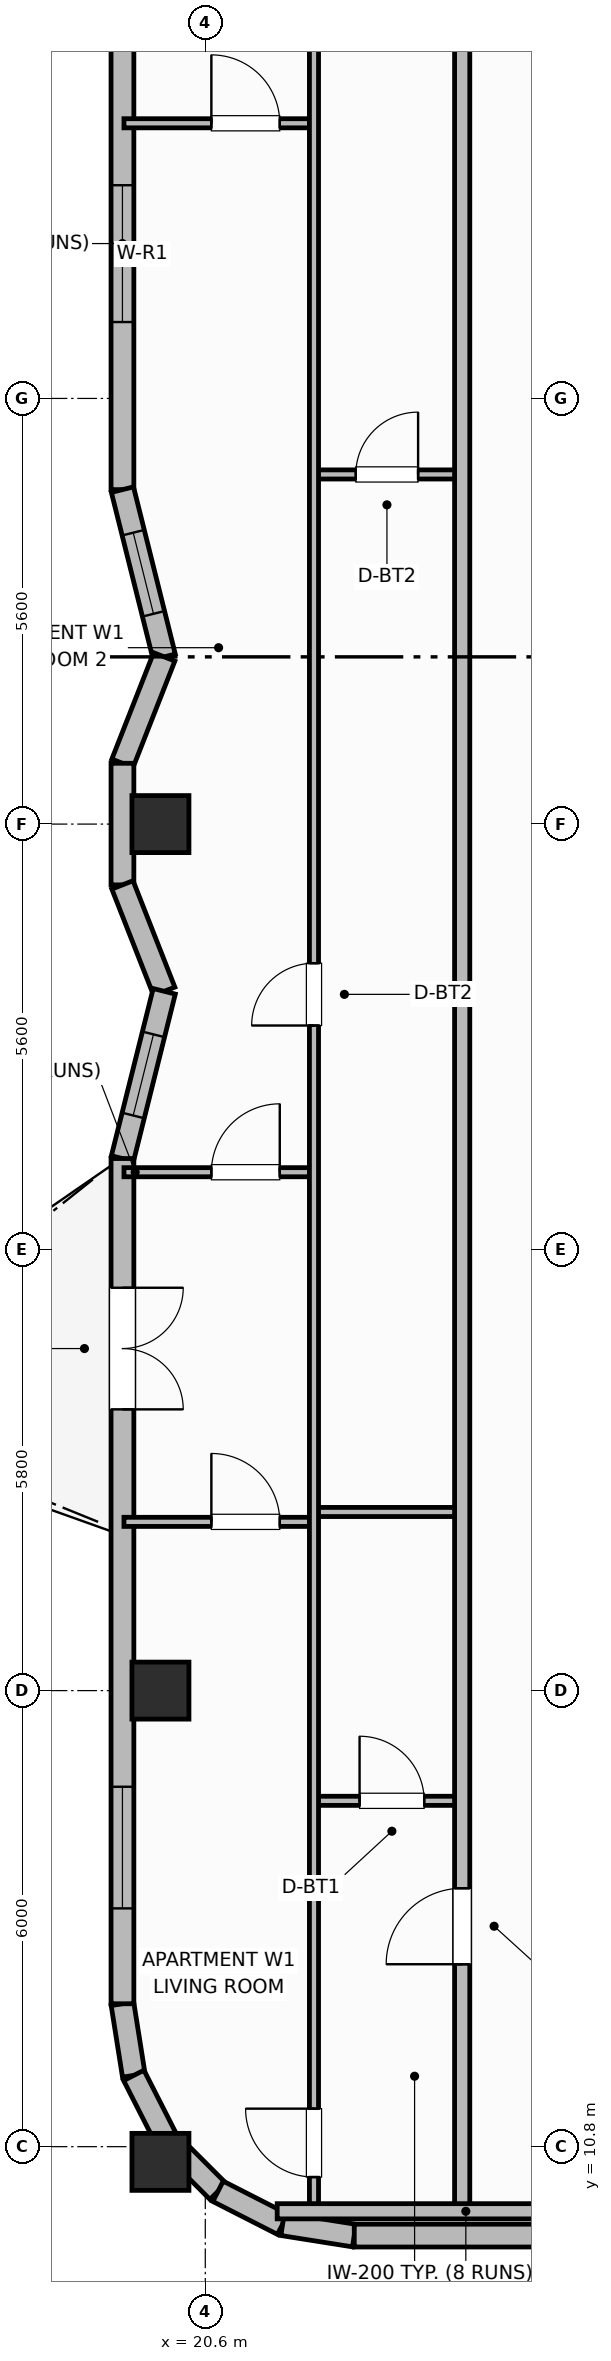
"""IFC4 building model, lengths in metres.
Left out: names, types, materials, properties, quantities, classifications, styles, units other than length and angle.
Written with IfcOpenShell. Run it as: python <this file> out.ifc"""

import sys

from ifc_helpers import new_model, si_unit, direction, frame, frame_2d, origin, origin_2d, place, context, subcontext, project, spatial, rectangle, extrude, element, fill, save


model = new_model("IFC4")
c1 = context("Model", 3, precision=1e-05, world=origin(), true_north=direction((0.0, 1.0)))
c2 = subcontext(c1, "Body", "Model", "MODEL_VIEW")
j1 = project(units=[si_unit("LENGTHUNIT", "METRE"), si_unit("PLANEANGLEUNIT", "RADIAN")], contexts=[c1])
p1 = place(None, origin())
s1 = spatial("IfcSite", under=j1, at=p1, CompositionType="ELEMENT")
p2 = place(p1, origin())
s2 = spatial("IfcBuilding", under=s1, at=p2, CompositionType="ELEMENT")
p3 = place(p2, frame((0.0, 0.0, 263.9)))
s3 = spatial("IfcBuildingStorey", under=s2, at=p3, CompositionType="ELEMENT", Elevation=263.9)
for number, where, z_axis, x_axis in (
    (1, (20.01, 10.6, 0.0), (0.0, 0.0, 1.0), (1.0, 0.0, 0.0)),
    (2, (20.01, 16.8, 0.0), (0.0, 0.0, 1.0), (1.0, 0.0, 0.0)),
    (3, (20.01, 28.2, 0.0), (0.0, 0.0, 1.0), (1.0, 0.0, 0.0)),
):
    element("IfcColumn", number, at=place(p3, frame(where, z_axis=z_axis, x_axis=x_axis)), inside=s3, PredefinedType="COLUMN", context=c2, shape_type="SweptSolid", body=[
        extrude(rectangle(XDim=0.75, YDim=0.75, at=origin_2d()), origin(), (0.0, 0.0, 1.0), 3.7),
    ])
p4 = place(p3, frame((19.51, 12.68, 0.0), z_axis=(0.0, 0.0, 1.0), x_axis=(0.156343617883, -0.987702725088, 0.0)))
e4 = element("IfcWall", 4, at=p4, inside=s3, PredefinedType="SOLIDWALL", context=c2, shape_type="SweptSolid", body=[
    extrude(rectangle(XDim=0.954, YDim=0.3, at=frame_2d((0.477, 0.0))), origin(), (0.0, 0.0, 1.0), 2.73),
])
for number, where, z_axis, x_axis in (
    (5, (19.659, 11.738, 0.0), (0.0, 0.0, 1.0), (0.454, -0.891, 0.0)),
    (6, (20.093, 10.887, 0.0), (0.0, 0.0, 1.0), (0.707, -0.707, 0.0)),
):
    element("IfcWall", number, at=place(p3, frame(where, z_axis=z_axis, x_axis=x_axis)), inside=s3, PredefinedType="SOLIDWALL", context=c2, shape_type="SweptSolid", body=[
        extrude(rectangle(XDim=0.954, YDim=0.3, at=frame_2d((0.477, 0.0))), origin(), (0.0, 0.0, 1.0), 2.73),
    ])
p5 = place(p3, frame((20.767, 10.212, 0.0), z_axis=(0.0, 0.0, 1.0), x_axis=(0.891023873617, -0.45395644796, 0.0)))
e7 = element("IfcWall", 7, at=p5, inside=s3, PredefinedType="SOLIDWALL", context=c2, shape_type="SweptSolid", body=[
    extrude(rectangle(XDim=0.954, YDim=0.3, at=frame_2d((0.477, 0.0))), origin(), (0.0, 0.0, 1.0), 2.73),
])
p6 = place(p3, frame((21.617, 9.779, 0.0), z_axis=(0.0, 0.0, 1.0), x_axis=(0.987669453596, -0.156553666304, 0.0)))
e8 = element("IfcWall", 8, at=p6, inside=s3, PredefinedType="SOLIDWALL", context=c2, shape_type="SweptSolid", body=[
    extrude(rectangle(XDim=0.954, YDim=0.3, at=frame_2d((0.477, 0.0))), origin(), (0.0, 0.0, 1.0), 2.73),
])
p7 = place(p3, frame((22.56, 9.63, 0.0), z_axis=(0.0, 0.0, 1.0), x_axis=(1.0, 0.0, 0.0)))
e9 = element("IfcWall", 9, at=p7, inside=s3, PredefinedType="SOLIDWALL", context=c2, shape_type="SweptSolid", body=[
    extrude(rectangle(XDim=33.28, YDim=0.3, at=frame_2d((16.64, 0.0))), origin(), (0.0, 0.0, 1.0), 2.73),
])
p8 = place(p7, frame((5.18, 0.0, 0.71)))
e10 = element("IfcOpeningElement", 10, at=p8, cuts=e9, PredefinedType="OPENING", context=c2, shape_type="SweptSolid", body=[
    extrude(rectangle(XDim=1.6, YDim=1.9, at=frame_2d((0.8, 0.95))), frame((0.0, 0.16, 0.0), z_axis=(0.0, -1.0, 0.0), x_axis=(1.0, 0.0, 0.0)), (0.0, 0.0, 1.0), 0.32),
])
p9 = place(p7, frame((8.733, 0.0, 0.71)))
e11 = element("IfcOpeningElement", 11, at=p9, cuts=e9, PredefinedType="OPENING", context=c2, shape_type="SweptSolid", body=[
    extrude(rectangle(XDim=1.6, YDim=1.9, at=frame_2d((0.8, 0.95))), frame((0.0, 0.16, 0.0), z_axis=(0.0, -1.0, 0.0), x_axis=(1.0, 0.0, 0.0)), (0.0, 0.0, 1.0), 0.32),
])
p10 = place(p7, frame((15.84, 0.0, 0.71)))
e12 = element("IfcOpeningElement", 12, at=p10, cuts=e9, PredefinedType="OPENING", context=c2, shape_type="SweptSolid", body=[
    extrude(rectangle(XDim=1.6, YDim=1.9, at=frame_2d((0.8, 0.95))), frame((0.0, 0.16, 0.0), z_axis=(0.0, -1.0, 0.0), x_axis=(1.0, 0.0, 0.0)), (0.0, 0.0, 1.0), 0.32),
])
p11 = place(p7, frame((22.947, 0.0, 0.71)))
e13 = element("IfcOpeningElement", 13, at=p11, cuts=e9, PredefinedType="OPENING", context=c2, shape_type="SweptSolid", body=[
    extrude(rectangle(XDim=1.6, YDim=1.9, at=frame_2d((0.8, 0.95))), frame((0.0, 0.16, 0.0), z_axis=(0.0, -1.0, 0.0), x_axis=(1.0, 0.0, 0.0)), (0.0, 0.0, 1.0), 0.32),
])
p12 = place(p7, frame((26.5, 0.0, 0.71)))
e14 = element("IfcOpeningElement", 14, at=p12, cuts=e9, PredefinedType="OPENING", context=c2, shape_type="SweptSolid", body=[
    extrude(rectangle(XDim=1.6, YDim=1.9, at=frame_2d((0.8, 0.95))), frame((0.0, 0.16, 0.0), z_axis=(0.0, -1.0, 0.0), x_axis=(1.0, 0.0, 0.0)), (0.0, 0.0, 1.0), 0.32),
])
p13 = place(p3, frame((19.51, 43.72, 0.0), z_axis=(0.0, 0.0, 1.0), x_axis=(0.0, -1.0, 0.0)))
e15 = element("IfcWall", 15, at=p13, inside=s3, PredefinedType="SOLIDWALL", context=c2, shape_type="SweptSolid", body=[
    extrude(rectangle(XDim=11.12, YDim=0.3, at=frame_2d((5.56, 0.0))), origin(), (0.0, 0.0, 1.0), 2.73),
])
p14 = place(p13, frame((1.08, 0.0, 0.72)))
e16 = element("IfcOpeningElement", 16, at=p14, cuts=e15, PredefinedType="OPENING", context=c2, shape_type="SweptSolid", body=[
    extrude(rectangle(XDim=1.4, YDim=1.85, at=frame_2d((0.7, 0.925))), frame((0.0, 0.16, 0.0), z_axis=(0.0, -1.0, 0.0), x_axis=(1.0, 0.0, 0.0)), (0.0, 0.0, 1.0), 0.32),
])
p15 = place(p13, frame((7.115, 0.0, 0.76)))
e17 = element("IfcOpeningElement", 17, at=p15, cuts=e15, PredefinedType="OPENING", context=c2, shape_type="SweptSolid", body=[
    extrude(rectangle(XDim=1.8, YDim=1.85, at=frame_2d((0.9, 0.925))), frame((0.0, 0.16, 0.0), z_axis=(0.0, -1.0, 0.0), x_axis=(1.0, 0.0, 0.0)), (0.0, 0.0, 1.0), 0.32),
])
p16 = place(p3, frame((19.51, 32.6, 0.0), z_axis=(0.0, 0.0, 1.0), x_axis=(0.242535625036, -0.970142500145, 0.0)))
e18 = element("IfcWall", 18, at=p16, inside=s3, PredefinedType="SOLIDWALL", context=c2, shape_type="SweptSolid", body=[
    extrude(rectangle(XDim=2.268, YDim=0.3, at=frame_2d((1.134, 0.0))), origin(), (0.0, 0.0, 1.0), 2.73),
])
p17 = place(p16, frame((0.584, 0.0, 0.92)))
e19 = element("IfcOpeningElement", 19, at=p17, cuts=e18, PredefinedType="OPENING", context=c2, shape_type="SweptSolid", body=[
    extrude(rectangle(XDim=1.1, YDim=1.65, at=frame_2d((0.55, 0.825))), frame((0.0, 0.16, 0.0), z_axis=(0.0, -1.0, 0.0), x_axis=(1.0, 0.0, 0.0)), (0.0, 0.0, 1.0), 0.32),
])
p18 = place(p3, frame((20.06, 30.4, 0.0), z_axis=(0.0, 0.0, 1.0), x_axis=(-0.365702591843, -0.930731762818, 0.0)))
e20 = element("IfcWall", 20, at=p18, inside=s3, PredefinedType="SOLIDWALL", context=c2, shape_type="SweptSolid", body=[
    extrude(rectangle(XDim=1.504, YDim=0.3, at=frame_2d((0.752, 0.0))), origin(), (0.0, 0.0, 1.0), 2.73),
])
p19 = place(p3, frame((19.51, 29.0, 0.0), z_axis=(0.0, 0.0, 1.0), x_axis=(0.0, -1.0, 0.0)))
e21 = element("IfcWall", 21, at=p19, inside=s3, PredefinedType="SOLIDWALL", context=c2, shape_type="SweptSolid", body=[
    extrude(rectangle(XDim=1.6, YDim=0.3, at=frame_2d((0.8, 0.0))), origin(), (0.0, 0.0, 1.0), 2.73),
])
p20 = place(p3, frame((19.51, 27.4, 0.0), z_axis=(0.0, 0.0, 1.0), x_axis=(0.365702591843, -0.930731762818, 0.0)))
e22 = element("IfcWall", 22, at=p20, inside=s3, PredefinedType="SOLIDWALL", context=c2, shape_type="SweptSolid", body=[
    extrude(rectangle(XDim=1.504, YDim=0.3, at=frame_2d((0.752, 0.0))), origin(), (0.0, 0.0, 1.0), 2.73),
])
p21 = place(p3, frame((20.06, 26.0, 0.0), z_axis=(0.0, 0.0, 1.0), x_axis=(-0.242560957029, -0.970136166796, 0.0)))
e23 = element("IfcWall", 23, at=p21, inside=s3, PredefinedType="SOLIDWALL", context=c2, shape_type="SweptSolid", body=[
    extrude(rectangle(XDim=2.268, YDim=0.3, at=frame_2d((1.134, 0.0))), origin(), (0.0, 0.0, 1.0), 2.73),
])
p22 = place(p21, frame((0.584, 0.0, 0.92)))
e24 = element("IfcOpeningElement", 24, at=p22, cuts=e23, PredefinedType="OPENING", context=c2, shape_type="SweptSolid", body=[
    extrude(rectangle(XDim=1.1, YDim=1.65, at=frame_2d((0.55, 0.825))), frame((0.0, 0.16, 0.0), z_axis=(0.0, -1.0, 0.0), x_axis=(1.0, 0.0, 0.0)), (0.0, 0.0, 1.0), 0.32),
])
p23 = place(p3, frame((19.51, 23.8, 0.0), z_axis=(0.0, 0.0, 1.0), x_axis=(0.0, -1.0, 0.0)))
e25 = element("IfcWall", 25, at=p23, inside=s3, PredefinedType="SOLIDWALL", context=c2, shape_type="SweptSolid", body=[
    extrude(rectangle(XDim=11.12, YDim=0.3, at=frame_2d((5.56, 0.0))), origin(), (0.0, 0.0, 1.0), 2.73),
])
p24 = place(p23, frame((1.7, 0.0, 0.0)))
e26 = element("IfcOpeningElement", 26, at=p24, cuts=e25, PredefinedType="OPENING", context=c2, shape_type="SweptSolid", body=[
    extrude(rectangle(XDim=1.6, YDim=2.1, at=frame_2d((0.8, 1.05))), frame((0.0, 0.16, 0.0), z_axis=(0.0, -1.0, 0.0), x_axis=(1.0, 0.0, 0.0)), (0.0, 0.0, 1.0), 0.32),
])
p25 = place(p23, frame((8.265, 0.0, 0.71)))
e27 = element("IfcOpeningElement", 27, at=p25, cuts=e25, PredefinedType="OPENING", context=c2, shape_type="SweptSolid", body=[
    extrude(rectangle(XDim=1.6, YDim=1.9, at=frame_2d((0.8, 0.95))), frame((0.0, 0.16, 0.0), z_axis=(0.0, -1.0, 0.0), x_axis=(1.0, 0.0, 0.0)), (0.0, 0.0, 1.0), 0.32),
])
p26 = place(p3, frame((22.03, 15.35, 0.0), z_axis=(0.0, 0.0, 1.0), x_axis=(1.0, 0.0, 0.0)))
e28 = element("IfcWall", 28, at=p26, inside=s3, PredefinedType="PARTITIONING", context=c2, shape_type="SweptSolid", body=[
    extrude(rectangle(XDim=1.95, YDim=0.12, at=frame_2d((0.975, 0.0))), origin(), (0.0, 0.0, 1.0), 2.56),
])
p27 = place(p26, frame((0.6, 0.0, 0.0)))
e29 = element("IfcOpeningElement", 29, at=p27, cuts=e28, PredefinedType="OPENING", context=c2, shape_type="SweptSolid", body=[
    extrude(rectangle(XDim=0.85, YDim=2.1, at=frame_2d((0.425, 1.05))), frame((0.0, 0.07, 0.0), z_axis=(0.0, -1.0, 0.0), x_axis=(1.0, 0.0, 0.0)), (0.0, 0.0, 1.0), 0.14),
])
p28 = place(p3, frame((22.03, 19.15, 0.0), z_axis=(0.0, 0.0, 1.0), x_axis=(1.0, 0.0, 0.0)))
e30 = element("IfcWall", 30, at=p28, inside=s3, PredefinedType="PARTITIONING", context=c2, shape_type="SweptSolid", body=[
    extrude(rectangle(XDim=1.95, YDim=0.12, at=frame_2d((0.975, 0.0))), origin(), (0.0, 0.0, 1.0), 2.56),
])
p29 = place(p3, frame((22.03, 32.8, 0.0), z_axis=(0.0, 0.0, 1.0), x_axis=(1.0, 0.0, 0.0)))
e31 = element("IfcWall", 31, at=p29, inside=s3, PredefinedType="PARTITIONING", context=c2, shape_type="SweptSolid", body=[
    extrude(rectangle(XDim=1.95, YDim=0.12, at=frame_2d((0.975, 0.0))), origin(), (0.0, 0.0, 1.0), 2.56),
])
p30 = place(p29, frame((0.55, 0.0, 0.0)))
e32 = element("IfcOpeningElement", 32, at=p30, cuts=e31, PredefinedType="OPENING", context=c2, shape_type="SweptSolid", body=[
    extrude(rectangle(XDim=0.82, YDim=2.08, at=frame_2d((0.41, 1.04))), frame((0.0, 0.07, 0.0), z_axis=(0.0, -1.0, 0.0), x_axis=(1.0, 0.0, 0.0)), (0.0, 0.0, 1.0), 0.14),
])
p31 = place(p3, frame((19.53, 19.02, 0.0), z_axis=(0.0, 0.0, 1.0), x_axis=(1.0, 0.0, 0.0)))
e33 = element("IfcWall", 33, at=p31, inside=s3, PredefinedType="PARTITIONING", context=c2, shape_type="SweptSolid", body=[
    extrude(rectangle(XDim=2.5, YDim=0.12, at=frame_2d((1.25, 0.0))), origin(), (0.0, 0.0, 1.0), 2.56),
])
p32 = place(p31, frame((1.15, 0.0, 0.0)))
e34 = element("IfcOpeningElement", 34, at=p32, cuts=e33, PredefinedType="OPENING", context=c2, shape_type="SweptSolid", body=[
    extrude(rectangle(XDim=0.9, YDim=2.1, at=frame_2d((0.45, 1.05))), frame((0.0, 0.07, 0.0), z_axis=(0.0, -1.0, 0.0), x_axis=(1.0, 0.0, 0.0)), (0.0, 0.0, 1.0), 0.14),
])
p33 = place(p3, frame((19.53, 23.62, 0.0), z_axis=(0.0, 0.0, 1.0), x_axis=(1.0, 0.0, 0.0)))
e35 = element("IfcWall", 35, at=p33, inside=s3, PredefinedType="PARTITIONING", context=c2, shape_type="SweptSolid", body=[
    extrude(rectangle(XDim=2.5, YDim=0.12, at=frame_2d((1.25, 0.0))), origin(), (0.0, 0.0, 1.0), 2.56),
])
p34 = place(p33, frame((1.15, 0.0, 0.0)))
e36 = element("IfcOpeningElement", 36, at=p34, cuts=e35, PredefinedType="OPENING", context=c2, shape_type="SweptSolid", body=[
    extrude(rectangle(XDim=0.9, YDim=2.1, at=frame_2d((0.45, 1.05))), frame((0.0, 0.07, 0.0), z_axis=(0.0, -1.0, 0.0), x_axis=(1.0, 0.0, 0.0)), (0.0, 0.0, 1.0), 0.14),
])
p35 = place(p3, frame((19.53, 37.42, 0.0), z_axis=(0.0, 0.0, 1.0), x_axis=(1.0, 0.0, 0.0)))
e37 = element("IfcWall", 37, at=p35, inside=s3, PredefinedType="PARTITIONING", context=c2, shape_type="SweptSolid", body=[
    extrude(rectangle(XDim=2.5, YDim=0.12, at=frame_2d((1.25, 0.0))), origin(), (0.0, 0.0, 1.0), 2.56),
])
p36 = place(p35, frame((1.15, 0.0, 0.0)))
e38 = element("IfcOpeningElement", 38, at=p36, cuts=e37, PredefinedType="OPENING", context=c2, shape_type="SweptSolid", body=[
    extrude(rectangle(XDim=0.9, YDim=2.1, at=frame_2d((0.45, 1.05))), frame((0.0, 0.07, 0.0), z_axis=(0.0, -1.0, 0.0), x_axis=(1.0, 0.0, 0.0)), (0.0, 0.0, 1.0), 0.14),
])
p37 = place(p3, frame((22.03, 9.99, 0.0), z_axis=(0.0, 0.0, 1.0), x_axis=(0.0, 1.0, 0.0)))
e39 = element("IfcWall", 39, at=p37, inside=s3, PredefinedType="PARTITIONING", context=c2, shape_type="SweptSolid", body=[
    extrude(rectangle(XDim=36.42, YDim=0.12, at=frame_2d((18.21, 0.0))), origin(), (0.0, 0.0, 1.0), 2.56),
])
p38 = place(p37, frame((0.41, 0.0, 0.0)))
e40 = element("IfcOpeningElement", 40, at=p38, cuts=e39, PredefinedType="OPENING", context=c2, shape_type="SweptSolid", body=[
    extrude(rectangle(XDim=0.9, YDim=2.1, at=frame_2d((0.45, 1.05))), frame((0.0, 0.07, 0.0), z_axis=(0.0, -1.0, 0.0), x_axis=(1.0, 0.0, 0.0)), (0.0, 0.0, 1.0), 0.14),
])
p39 = place(p37, frame((15.56, 0.0, 0.0)))
e41 = element("IfcOpeningElement", 41, at=p39, cuts=e39, PredefinedType="OPENING", context=c2, shape_type="SweptSolid", body=[
    extrude(rectangle(XDim=0.82, YDim=2.08, at=frame_2d((0.41, 1.04))), frame((0.0, 0.07, 0.0), z_axis=(0.0, -1.0, 0.0), x_axis=(1.0, 0.0, 0.0)), (0.0, 0.0, 1.0), 0.14),
])
p40 = place(p3, frame((23.98, 9.95, 0.0), z_axis=(0.0, 0.0, 1.0), x_axis=(0.0, 1.0, 0.0)))
e42 = element("IfcWall", 42, at=p40, inside=s3, PredefinedType="PARTITIONING", context=c2, shape_type="SweptSolid", body=[
    extrude(rectangle(XDim=36.5, YDim=0.2, at=frame_2d((18.25, 0.0))), origin(), (0.0, 0.0, 1.0), 2.56),
])
p41 = place(p40, frame((3.25, 0.0, 0.0)))
e43 = element("IfcOpeningElement", 43, at=p41, cuts=e42, PredefinedType="OPENING", context=c2, shape_type="SweptSolid", body=[
    extrude(rectangle(XDim=1.0, YDim=2.15, at=frame_2d((0.5, 1.075))), frame((0.0, 0.11, 0.0), z_axis=(0.0, -1.0, 0.0), x_axis=(1.0, 0.0, 0.0)), (0.0, 0.0, 1.0), 0.22),
])
p42 = place(p3, frame((21.546, 9.95, 0.0), z_axis=(0.0, 0.0, 1.0), x_axis=(1.0, 0.0, 0.0)))
e44 = element("IfcWall", 44, at=p42, inside=s3, PredefinedType="PARTITIONING", context=c2, shape_type="SweptSolid", body=[
    extrude(rectangle(XDim=3.754, YDim=0.2, at=frame_2d((1.877, 0.0))), origin(), (0.0, 0.0, 1.0), 2.56),
])
p43 = place(p15, origin())
e45 = element("IfcWindow", 45, at=p43, inside=s3, PartitioningType="SINGLE_PANEL", PredefinedType="WINDOW", context=c2, shape_type="SweptSolid", body=[
    extrude(rectangle(XDim=1.8, YDim=1.85, at=frame_2d((0.9, 0.925))), frame((0.0, 0.03, 0.0), z_axis=(0.0, -1.0, 0.0), x_axis=(1.0, 0.0, 0.0)), (0.0, 0.0, 1.0), 0.06),
])
fill(e17, e45)
p44 = place(p17, origin())
e46 = element("IfcWindow", 46, at=p44, inside=s3, PartitioningType="SINGLE_PANEL", PredefinedType="WINDOW", context=c2, shape_type="SweptSolid", body=[
    extrude(rectangle(XDim=1.1, YDim=1.65, at=frame_2d((0.55, 0.825))), frame((0.0, 0.03, 0.0), z_axis=(0.0, -1.0, 0.0), x_axis=(1.0, 0.0, 0.0)), (0.0, 0.0, 1.0), 0.06),
])
fill(e19, e46)
p45 = place(p22, origin())
e47 = element("IfcWindow", 47, at=p45, inside=s3, PartitioningType="SINGLE_PANEL", PredefinedType="WINDOW", context=c2, shape_type="SweptSolid", body=[
    extrude(rectangle(XDim=1.1, YDim=1.65, at=frame_2d((0.55, 0.825))), frame((0.0, 0.03, 0.0), z_axis=(0.0, -1.0, 0.0), x_axis=(1.0, 0.0, 0.0)), (0.0, 0.0, 1.0), 0.06),
])
fill(e24, e47)
p46 = place(p24, origin())
e48 = element("IfcDoor", 48, at=p46, inside=s3, OperationType="DOUBLE_DOOR_SINGLE_SWING", PredefinedType="DOOR", context=c2, shape_type="SweptSolid", body=[
    extrude(rectangle(XDim=1.6, YDim=2.1, at=frame_2d((0.8, 1.05))), frame((0.0, 0.025, 0.0), z_axis=(0.0, -1.0, 0.0), x_axis=(1.0, 0.0, 0.0)), (0.0, 0.0, 1.0), 0.05),
])
fill(e26, e48)
p47 = place(p25, origin())
e49 = element("IfcWindow", 49, at=p47, inside=s3, PartitioningType="SINGLE_PANEL", PredefinedType="WINDOW", context=c2, shape_type="SweptSolid", body=[
    extrude(rectangle(XDim=1.6, YDim=1.9, at=frame_2d((0.8, 0.95))), frame((0.0, 0.03, 0.0), z_axis=(0.0, -1.0, 0.0), x_axis=(1.0, 0.0, 0.0)), (0.0, 0.0, 1.0), 0.06),
])
fill(e27, e49)
p48 = place(p27, origin())
e50 = element("IfcDoor", 50, at=p48, inside=s3, OperationType="SINGLE_SWING_LEFT", PredefinedType="DOOR", context=c2, shape_type="SweptSolid", body=[
    extrude(rectangle(XDim=0.85, YDim=2.1, at=frame_2d((0.425, 1.05))), frame((0.0, 0.025, 0.0), z_axis=(0.0, -1.0, 0.0), x_axis=(1.0, 0.0, 0.0)), (0.0, 0.0, 1.0), 0.05),
])
fill(e29, e50)
p49 = place(p30, origin())
e51 = element("IfcDoor", 51, at=p49, inside=s3, OperationType="SINGLE_SWING_RIGHT", PredefinedType="DOOR", context=c2, shape_type="SweptSolid", body=[
    extrude(rectangle(XDim=0.82, YDim=2.08, at=frame_2d((0.41, 1.04))), frame((0.0, 0.025, 0.0), z_axis=(0.0, -1.0, 0.0), x_axis=(1.0, 0.0, 0.0)), (0.0, 0.0, 1.0), 0.05),
])
fill(e32, e51)
p50 = place(p32, origin())
e52 = element("IfcDoor", 52, at=p50, inside=s3, OperationType="SINGLE_SWING_LEFT", PredefinedType="DOOR", context=c2, shape_type="SweptSolid", body=[
    extrude(rectangle(XDim=0.9, YDim=2.1, at=frame_2d((0.45, 1.05))), frame((0.0, 0.025, 0.0), z_axis=(0.0, -1.0, 0.0), x_axis=(1.0, 0.0, 0.0)), (0.0, 0.0, 1.0), 0.05),
])
fill(e34, e52)
p51 = place(p34, origin())
e53 = element("IfcDoor", 53, at=p51, inside=s3, OperationType="SINGLE_SWING_RIGHT", PredefinedType="DOOR", context=c2, shape_type="SweptSolid", body=[
    extrude(rectangle(XDim=0.9, YDim=2.1, at=frame_2d((0.45, 1.05))), frame((0.0, 0.025, 0.0), z_axis=(0.0, -1.0, 0.0), x_axis=(1.0, 0.0, 0.0)), (0.0, 0.0, 1.0), 0.05),
])
fill(e36, e53)
p52 = place(p36, origin())
e54 = element("IfcDoor", 54, at=p52, inside=s3, OperationType="SINGLE_SWING_LEFT", PredefinedType="DOOR", context=c2, shape_type="SweptSolid", body=[
    extrude(rectangle(XDim=0.9, YDim=2.1, at=frame_2d((0.45, 1.05))), frame((0.0, 0.025, 0.0), z_axis=(0.0, -1.0, 0.0), x_axis=(1.0, 0.0, 0.0)), (0.0, 0.0, 1.0), 0.05),
])
fill(e38, e54)
p53 = place(p38, origin())
e55 = element("IfcDoor", 55, at=p53, inside=s3, OperationType="SINGLE_SWING_RIGHT", PredefinedType="DOOR", context=c2, shape_type="SweptSolid", body=[
    extrude(rectangle(XDim=0.9, YDim=2.1, at=frame_2d((0.45, 1.05))), frame((0.0, 0.025, 0.0), z_axis=(0.0, -1.0, 0.0), x_axis=(1.0, 0.0, 0.0)), (0.0, 0.0, 1.0), 0.05),
])
fill(e40, e55)
p54 = place(p39, origin())
e56 = element("IfcDoor", 56, at=p54, inside=s3, OperationType="SINGLE_SWING_LEFT", PredefinedType="DOOR", context=c2, shape_type="SweptSolid", body=[
    extrude(rectangle(XDim=0.82, YDim=2.08, at=frame_2d((0.41, 1.04))), frame((0.0, 0.025, 0.0), z_axis=(0.0, -1.0, 0.0), x_axis=(1.0, 0.0, 0.0)), (0.0, 0.0, 1.0), 0.05),
])
fill(e41, e56)
p55 = place(p41, origin())
e57 = element("IfcDoor", 57, at=p55, inside=s3, OperationType="SINGLE_SWING_LEFT", PredefinedType="DOOR", context=c2, shape_type="SweptSolid", body=[
    extrude(rectangle(XDim=1.0, YDim=2.15, at=frame_2d((0.5, 1.075))), frame((0.0, 0.025, 0.0), z_axis=(0.0, -1.0, 0.0), x_axis=(1.0, 0.0, 0.0)), (0.0, 0.0, 1.0), 0.05),
])
fill(e43, e57)
save(model, sys.argv[1])
